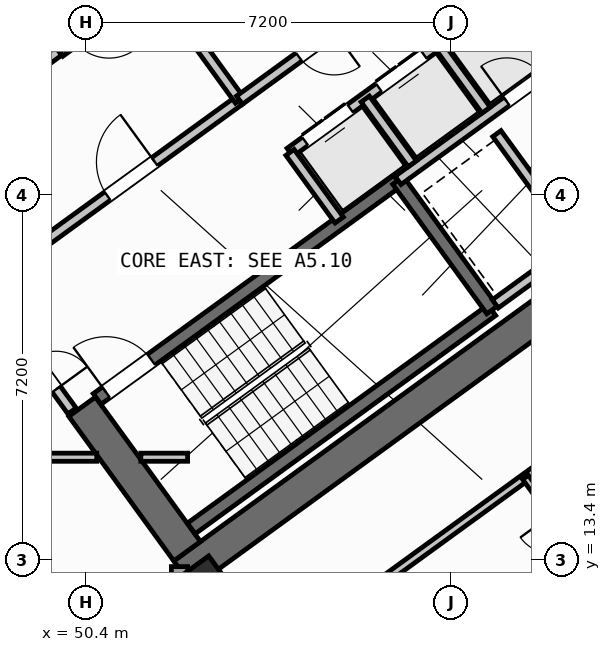
"""IFC4 building model, lengths in metres.
Left out: names, types, materials, properties, quantities, classifications, styles, units other than length and angle.
Written with IfcOpenShell. Run it as: python <this file> out.ifc"""

import sys

from ifc_helpers import new_model, si_unit, direction, frame, frame_2d, origin, origin_2d, place, context, subcontext, project, spatial, rectangle, hollow_rectangle, extrude, source, transform, mapped, element, fill, save


model = new_model("IFC4")
c1 = context("Model", 3, precision=1e-05, world=origin(), true_north=direction((0.0, 1.0)))
c2 = subcontext(c1, "Body", "Model", "MODEL_VIEW")
j1 = project(units=[si_unit("LENGTHUNIT", "METRE"), si_unit("PLANEANGLEUNIT", "RADIAN")], contexts=[c1])
p1 = place(None, origin())
s1 = spatial("IfcSite", under=j1, at=p1, CompositionType="ELEMENT")
p2 = place(p1, origin())
s2 = spatial("IfcBuilding", under=s1, at=p2, CompositionType="ELEMENT")
p3 = place(p2, frame((0.0, 0.0, 24.0)))
s3 = spatial("IfcBuildingStorey", under=s2, at=p3, CompositionType="ELEMENT", Elevation=24.0)
p4 = place(p3, frame((52.318, 13.11, 0.0), z_axis=(0.0, 0.0, 1.0), x_axis=(0.809019445368, 0.587781878776, 0.0)))
e1 = element("IfcWall", 1, at=p4, inside=s3, PredefinedType="SHEAR", context=c2, shape_type="SweptSolid", body=[
    extrude(rectangle(XDim=12.44, YDim=0.65, at=frame_2d((6.22, 0.0))), origin(), (0.0, 0.0, 1.0), 3.35),
])
p5 = place(p3, frame((52.39, 13.564, 0.0), z_axis=(0.0, 0.0, 1.0), x_axis=(-0.58779688989, 0.809008539037, 0.0)))
e2 = element("IfcWall", 2, at=p5, inside=s3, PredefinedType="SHEAR", context=c2, shape_type="SweptSolid", body=[
    extrude(rectangle(XDim=3.525, YDim=0.65, at=frame_2d((1.763, 0.0))), origin(), (0.0, 0.0, 1.0), 3.35),
])
m1 = source(origin(), c2, "Body", "SweptSolid", [
    extrude(hollow_rectangle(XDim=1.0, YDim=1.0, WallThickness=0.04, at=origin_2d()), origin(), (0.0, 0.0, 1.0), 3.6),
])
p6 = place(p3, frame((52.705, 12.773, 0.0), z_axis=(0.0, 0.0, 1.0), x_axis=(0.809016994375, 0.587785252292, 0.0)))
e3 = element("IfcColumn", 3, at=p6, inside=s3, PredefinedType="COLUMN", context=c2, shape_type="MappedRepresentation", body=[
    mapped(m1, transform((0.0, 0.0, 0.0), scale=1.0)),
])
p7 = place(p3, frame((70.18, 20.52, 0.0), z_axis=(0.0, 0.0, 1.0), x_axis=(-0.587784691012, 0.809017402169, 0.0)))
e4 = element("IfcWall", 4, at=p7, inside=s3, PredefinedType="PARAPET", context=c2, shape_type="SweptSolid", body=[
    extrude(rectangle(XDim=18.608, YDim=0.24, at=frame_2d((9.304, 0.0))), origin(), (0.0, 0.0, 1.0), 1.15),
])
p8 = place(p3, frame((57.59, 7.064, 0.0), z_axis=(0.0, 0.0, 1.0), x_axis=(0.809025796011, 0.58777313769, 0.0)))
e5 = element("IfcWall", 5, at=p8, inside=s3, PredefinedType="PARAPET", context=c2, shape_type="SweptSolid", body=[
    extrude(rectangle(XDim=10.674, YDim=0.24, at=frame_2d((5.337, 0.0))), origin(), (0.0, 0.0, 1.0), 1.15),
])
p9 = place(p3, frame((58.455, 35.484, 0.0), z_axis=(0.0, 0.0, 1.0), x_axis=(0.587783625747, -0.809018176127, 0.0)))
e6 = element("IfcWall", 6, at=p9, inside=s3, PredefinedType="STANDARD", context=c2, shape_type="SweptSolid", body=[
    extrude(rectangle(XDim=21.587, YDim=0.32, at=frame_2d((10.794, 0.0))), origin(), (0.0, 0.0, 1.0), 2.725),
])
p10 = place(p9, frame((2.994, 0.0, 0.8)))
e7 = element("IfcOpeningElement", 7, at=p10, cuts=e6, PredefinedType="OPENING", context=c2, shape_type="SweptSolid", body=[
    extrude(rectangle(XDim=2.1, YDim=1.55, at=frame_2d((1.05, 0.775))), frame((0.0, 0.17, 0.0), z_axis=(0.0, -1.0, 0.0), x_axis=(1.0, 0.0, 0.0)), (0.0, 0.0, 1.0), 0.34),
])
p11 = place(p9, frame((11.934, 0.0, 0.85)))
e8 = element("IfcOpeningElement", 8, at=p11, cuts=e6, PredefinedType="OPENING", context=c2, shape_type="SweptSolid", body=[
    extrude(rectangle(XDim=1.8, YDim=1.5, at=frame_2d((0.9, 0.75))), frame((0.0, 0.17, 0.0), z_axis=(0.0, -1.0, 0.0), x_axis=(1.0, 0.0, 0.0)), (0.0, 0.0, 1.0), 0.34),
])
p12 = place(p3, frame((71.098, 17.731, 0.0), z_axis=(0.0, 0.0, 1.0), x_axis=(-0.809021120468, -0.587779573171, 0.0)))
e9 = element("IfcWall", 9, at=p12, inside=s3, PredefinedType="STANDARD", context=c2, shape_type="SweptSolid", body=[
    extrude(rectangle(XDim=17.588, YDim=0.32, at=frame_2d((8.794, 0.0))), origin(), (0.0, 0.0, 1.0), 3.35),
])
p13 = place(p12, frame((1.611, 0.0, 0.0)))
e10 = element("IfcOpeningElement", 10, at=p13, cuts=e9, PredefinedType="OPENING", context=c2, shape_type="SweptSolid", body=[
    extrude(rectangle(XDim=1.05, YDim=2.15, at=frame_2d((0.525, 1.075))), frame((0.0, 0.17, 0.0), z_axis=(0.0, -1.0, 0.0), x_axis=(1.0, 0.0, 0.0)), (0.0, 0.0, 1.0), 0.34),
])
p14 = place(p12, frame((8.606, 0.0, 0.8)))
e11 = element("IfcOpeningElement", 11, at=p14, cuts=e9, PredefinedType="OPENING", context=c2, shape_type="SweptSolid", body=[
    extrude(rectangle(XDim=2.1, YDim=1.55, at=frame_2d((1.05, 0.775))), frame((0.0, 0.17, 0.0), z_axis=(0.0, -1.0, 0.0), x_axis=(1.0, 0.0, 0.0)), (0.0, 0.0, 1.0), 0.34),
])
p15 = place(p12, frame((12.881, 0.0, 0.8)))
e12 = element("IfcOpeningElement", 12, at=p15, cuts=e9, PredefinedType="OPENING", context=c2, shape_type="SweptSolid", body=[
    extrude(rectangle(XDim=2.1, YDim=1.55, at=frame_2d((1.05, 0.775))), frame((0.0, 0.17, 0.0), z_axis=(0.0, -1.0, 0.0), x_axis=(1.0, 0.0, 0.0)), (0.0, 0.0, 1.0), 0.34),
])
p16 = place(p3, frame((52.24, 13.261, 0.0), z_axis=(0.0, 0.0, 1.0), x_axis=(0.0, -1.0, 0.0)))
e13 = element("IfcWall", 13, at=p16, inside=s3, PredefinedType="STANDARD", context=c2, shape_type="SweptSolid", body=[
    extrude(rectangle(XDim=9.795, YDim=0.32, at=frame_2d((4.897, 0.0))), origin(), (0.0, 0.0, 1.0), 3.35),
])
p17 = place(p16, frame((3.094, 0.0, 0.8)))
e14 = element("IfcOpeningElement", 14, at=p17, cuts=e13, PredefinedType="OPENING", context=c2, shape_type="SweptSolid", body=[
    extrude(rectangle(XDim=2.1, YDim=1.55, at=frame_2d((1.05, 0.775))), frame((0.0, 0.17, 0.0), z_axis=(0.0, -1.0, 0.0), x_axis=(1.0, 0.0, 0.0)), (0.0, 0.0, 1.0), 0.34),
])
p18 = place(p16, frame((7.03, 0.0, 0.85)))
e15 = element("IfcOpeningElement", 15, at=p18, cuts=e13, PredefinedType="OPENING", context=c2, shape_type="SweptSolid", body=[
    extrude(rectangle(XDim=1.8, YDim=1.5, at=frame_2d((0.9, 0.75))), frame((0.0, 0.17, 0.0), z_axis=(0.0, -1.0, 0.0), x_axis=(1.0, 0.0, 0.0)), (0.0, 0.0, 1.0), 0.34),
])
p19 = place(p3, frame((49.863, 23.44, 0.0), z_axis=(0.0, 0.0, 1.0), x_axis=(0.809003474932, 0.587803859759, 0.0)))
e16 = element("IfcWall", 16, at=p19, inside=s3, PredefinedType="SHEAR", context=c2, shape_type="SweptSolid", body=[
    extrude(rectangle(XDim=7.46, YDim=0.26, at=frame_2d((3.73, 0.0))), origin(), (0.0, 0.0, 1.0), 3.35),
])
p20 = place(p19, frame((0.36, 0.0, 0.0)))
e17 = element("IfcOpeningElement", 17, at=p20, cuts=e16, PredefinedType="OPENING", context=c2, shape_type="SweptSolid", body=[
    extrude(rectangle(XDim=0.86, YDim=2.05, at=frame_2d((0.43, 1.025))), frame((0.0, 0.14, 0.0), z_axis=(0.0, -1.0, 0.0), x_axis=(1.0, 0.0, 0.0)), (0.0, 0.0, 1.0), 0.28),
])
p21 = place(p3, frame((49.855, 23.434, 0.0), z_axis=(0.0, 0.0, 1.0), x_axis=(-0.58776738483, 0.809029975545, 0.0)))
e18 = element("IfcWall", 18, at=p21, inside=s3, PredefinedType="SHEAR", context=c2, shape_type="SweptSolid", body=[
    extrude(rectangle(XDim=3.16, YDim=0.26, at=frame_2d((1.58, 0.0))), origin(), (0.0, 0.0, 1.0), 3.35),
])
p22 = place(p3, frame((52.472, 14.013, 0.0), z_axis=(0.0, 0.0, 1.0), x_axis=(0.809028366311, 0.587769599847, 0.0)))
e19 = element("IfcWall", 19, at=p22, inside=s3, PredefinedType="SHEAR", context=c2, shape_type="SweptSolid", body=[
    extrude(rectangle(XDim=7.33, YDim=0.26, at=frame_2d((3.665, 0.0))), origin(), (0.0, 0.0, 1.0), 3.35),
])
p23 = place(p3, frame((50.615, 16.57, 0.0), z_axis=(0.0, 0.0, 1.0), x_axis=(0.809028366311, 0.587769599847, 0.0)))
e20 = element("IfcWall", 20, at=p23, inside=s3, PredefinedType="SHEAR", context=c2, shape_type="SweptSolid", body=[
    extrude(rectangle(XDim=7.33, YDim=0.26, at=frame_2d((3.665, 0.0))), origin(), (0.0, 0.0, 1.0), 3.35),
])
p24 = place(p23, frame((0.22, 0.0, 0.0)))
e21 = element("IfcOpeningElement", 21, at=p24, cuts=e20, PredefinedType="OPENING", context=c2, shape_type="SweptSolid", body=[
    extrude(rectangle(XDim=1.1, YDim=2.1, at=frame_2d((0.55, 1.05))), frame((0.0, 0.14, 0.0), z_axis=(0.0, -1.0, 0.0), x_axis=(1.0, 0.0, 0.0)), (0.0, 0.0, 1.0), 0.28),
])
p25 = place(p3, frame((58.41, 18.327, 0.0), z_axis=(0.0, 0.0, 1.0), x_axis=(-0.58776738483, 0.809029975545, 0.0)))
e22 = element("IfcWall", 22, at=p25, inside=s3, PredefinedType="SHEAR", context=c2, shape_type="SweptSolid", body=[
    extrude(rectangle(XDim=3.16, YDim=0.26, at=frame_2d((1.58, 0.0))), origin(), (0.0, 0.0, 1.0), 3.35),
])
p26 = place(p3, frame((47.106, 21.437, 0.0), z_axis=(0.0, 0.0, 1.0), x_axis=(0.809012514015, 0.58779141893, 0.0)))
e23 = element("IfcWall", 23, at=p26, inside=s3, PredefinedType="STANDARD", context=c2, shape_type="SweptSolid", body=[
    extrude(rectangle(XDim=3.398, YDim=0.2, at=frame_2d((1.699, 0.0))), origin(), (0.0, 0.0, 1.0), 3.34),
])
p27 = place(p26, frame((0.408, 0.0, 0.0)))
e24 = element("IfcOpeningElement", 24, at=p27, cuts=e23, PredefinedType="OPENING", context=c2, shape_type="SweptSolid", body=[
    extrude(rectangle(XDim=1.3, YDim=2.2, at=frame_2d((0.65, 1.1))), frame((0.0, 0.11, 0.0), z_axis=(0.0, -1.0, 0.0), x_axis=(1.0, 0.0, 0.0)), (0.0, 0.0, 1.0), 0.22),
])
p28 = place(p3, frame((48.799, 19.107, 0.0), z_axis=(0.0, 0.0, 1.0), x_axis=(0.809012959416, 0.587790805897, 0.0)))
e25 = element("IfcWall", 25, at=p28, inside=s3, PredefinedType="STANDARD", context=c2, shape_type="SweptSolid", body=[
    extrude(rectangle(XDim=5.718, YDim=0.2, at=frame_2d((2.859, 0.0))), origin(), (0.0, 0.0, 1.0), 3.34),
])
p29 = place(p28, frame((2.498, 0.0, 0.0)))
e26 = element("IfcOpeningElement", 26, at=p29, cuts=e25, PredefinedType="OPENING", context=c2, shape_type="SweptSolid", body=[
    extrude(rectangle(XDim=1.15, YDim=2.1, at=frame_2d((0.575, 1.05))), frame((0.0, 0.11, 0.0), z_axis=(0.0, -1.0, 0.0), x_axis=(1.0, 0.0, 0.0)), (0.0, 0.0, 1.0), 0.22),
])
p30 = place(p3, frame((56.553, 20.884, 0.0), z_axis=(0.0, 0.0, 1.0), x_axis=(0.809035789462, 0.587759382205, 0.0)))
e27 = element("IfcWall", 27, at=p30, inside=s3, PredefinedType="STANDARD", context=c2, shape_type="SweptSolid", body=[
    extrude(rectangle(XDim=3.768, YDim=0.2, at=frame_2d((1.884, 0.0))), origin(), (0.0, 0.0, 1.0), 3.34),
])
p31 = place(p30, frame((2.65, 0.0, 0.0)))
e28 = element("IfcOpeningElement", 28, at=p31, cuts=e27, PredefinedType="OPENING", context=c2, shape_type="SweptSolid", body=[
    extrude(rectangle(XDim=0.86, YDim=2.05, at=frame_2d((0.43, 1.025))), frame((0.0, 0.11, 0.0), z_axis=(0.0, -1.0, 0.0), x_axis=(1.0, 0.0, 0.0)), (0.0, 0.0, 1.0), 0.22),
])
p32 = place(p3, frame((54.421, 21.436, 0.0), z_axis=(0.0, 0.0, 1.0), x_axis=(0.809013710463, 0.587789772183, 0.0)))
e29 = element("IfcWall", 29, at=p32, inside=s3, PredefinedType="STANDARD", context=c2, shape_type="SweptSolid", body=[
    extrude(rectangle(XDim=5.36, YDim=0.2, at=frame_2d((2.68, 0.0))), origin(), (0.0, 0.0, 1.0), 3.34),
])
p33 = place(p32, frame((0.37, 0.0, 0.0)))
e30 = element("IfcOpeningElement", 30, at=p33, cuts=e29, PredefinedType="OPENING", context=c2, shape_type="SweptSolid", body=[
    extrude(rectangle(XDim=1.1, YDim=2.15, at=frame_2d((0.55, 1.075))), frame((0.0, 0.11, 0.0), z_axis=(0.0, -1.0, 0.0), x_axis=(1.0, 0.0, 0.0)), (0.0, 0.0, 1.0), 0.22),
])
p34 = place(p32, frame((2.17, 0.0, 0.0)))
e31 = element("IfcOpeningElement", 31, at=p34, cuts=e29, PredefinedType="OPENING", context=c2, shape_type="SweptSolid", body=[
    extrude(rectangle(XDim=1.1, YDim=2.15, at=frame_2d((0.55, 1.075))), frame((0.0, 0.11, 0.0), z_axis=(0.0, -1.0, 0.0), x_axis=(1.0, 0.0, 0.0)), (0.0, 0.0, 1.0), 0.22),
])
p35 = place(p32, frame((3.97, 0.0, 0.0)))
e32 = element("IfcOpeningElement", 32, at=p35, cuts=e29, PredefinedType="OPENING", context=c2, shape_type="SweptSolid", body=[
    extrude(rectangle(XDim=1.1, YDim=2.15, at=frame_2d((0.55, 1.075))), frame((0.0, 0.11, 0.0), z_axis=(0.0, -1.0, 0.0), x_axis=(1.0, 0.0, 0.0)), (0.0, 0.0, 1.0), 0.22),
])
p36 = place(p3, frame((55.391, 20.102, 0.0), z_axis=(0.0, 0.0, 1.0), x_axis=(-0.58778447739, 0.809017557374, 0.0)))
e33 = element("IfcWall", 33, at=p36, inside=s3, PredefinedType="STANDARD", context=c2, shape_type="SweptSolid", body=[
    extrude(rectangle(XDim=1.65, YDim=0.2, at=frame_2d((0.825, 0.0))), origin(), (0.0, 0.0, 1.0), 3.34),
])
p37 = place(p3, frame((56.834, 21.212, 0.0), z_axis=(0.0, 0.0, 1.0), x_axis=(-0.58776738483, 0.809029975545, 0.0)))
e34 = element("IfcWall", 34, at=p37, inside=s3, PredefinedType="STANDARD", context=c2, shape_type="SweptSolid", body=[
    extrude(rectangle(XDim=1.58, YDim=0.2, at=frame_2d((0.79, 0.0))), origin(), (0.0, 0.0, 1.0), 3.34),
])
p38 = place(p3, frame((58.29, 22.27, 0.0), z_axis=(0.0, 0.0, 1.0), x_axis=(-0.587840865826, 0.808976585857, 0.0)))
e35 = element("IfcWall", 35, at=p38, inside=s3, PredefinedType="STANDARD", context=c2, shape_type="SweptSolid", body=[
    extrude(rectangle(XDim=1.58, YDim=0.2, at=frame_2d((0.79, 0.0))), origin(), (0.0, 0.0, 1.0), 3.34),
])
p39 = place(p3, frame((60.067, 19.655, 0.0), z_axis=(0.0, 0.0, 1.0), x_axis=(-0.587800520745, 0.809005900975, 0.0)))
e36 = element("IfcWall", 36, at=p39, inside=s3, PredefinedType="STANDARD", context=c2, shape_type="SweptSolid", body=[
    extrude(rectangle(XDim=2.66, YDim=0.2, at=frame_2d((1.33, 0.0))), origin(), (0.0, 0.0, 1.0), 3.34),
])
p40 = place(p3, frame((58.472, 18.447, 0.0), z_axis=(0.0, 0.0, 1.0), x_axis=(0.809022487728, 0.587777691266, 0.0)))
e37 = element("IfcWall", 37, at=p40, inside=s3, PredefinedType="STANDARD", context=c2, shape_type="SweptSolid", body=[
    extrude(rectangle(XDim=3.648, YDim=0.2, at=frame_2d((1.824, 0.0))), origin(), (0.0, 0.0, 1.0), 3.34),
])
p41 = place(p3, frame((53.425, 22.468, 0.0), z_axis=(0.0, 0.0, 1.0), x_axis=(-0.5877230039, 0.809062216821, 0.0)))
e38 = element("IfcWall", 38, at=p41, inside=s3, PredefinedType="STANDARD", context=c2, shape_type="SweptSolid", body=[
    extrude(rectangle(XDim=2.88, YDim=0.2, at=frame_2d((1.44, 0.0))), origin(), (0.0, 0.0, 1.0), 3.34),
])
p42 = place(p3, frame((53.425, 22.468, 0.0), z_axis=(0.0, 0.0, 1.0), x_axis=(0.80902705128, 0.587771409902, 0.0)))
e39 = element("IfcWall", 39, at=p42, inside=s3, PredefinedType="STANDARD", context=c2, shape_type="SweptSolid", body=[
    extrude(rectangle(XDim=5.368, YDim=0.2, at=frame_2d((2.684, 0.0))), origin(), (0.0, 0.0, 1.0), 3.34),
])
p43 = place(p42, frame((4.28, 0.0, 0.0)))
e40 = element("IfcOpeningElement", 40, at=p43, cuts=e39, PredefinedType="OPENING", context=c2, shape_type="SweptSolid", body=[
    extrude(rectangle(XDim=0.86, YDim=2.05, at=frame_2d((0.43, 1.025))), frame((0.0, 0.11, 0.0), z_axis=(0.0, -1.0, 0.0), x_axis=(1.0, 0.0, 0.0)), (0.0, 0.0, 1.0), 0.22),
])
p44 = place(p42, frame((1.45, 0.0, 0.0)))
e41 = element("IfcOpeningElement", 41, at=p44, cuts=e39, PredefinedType="OPENING", context=c2, shape_type="SweptSolid", body=[
    extrude(rectangle(XDim=0.86, YDim=2.05, at=frame_2d((0.43, 1.025))), frame((0.0, 0.11, 0.0), z_axis=(0.0, -1.0, 0.0), x_axis=(1.0, 0.0, 0.0)), (0.0, 0.0, 1.0), 0.22),
])
p45 = place(p3, frame((35.296, 15.42, 0.0), z_axis=(0.0, 0.0, 1.0), x_axis=(1.0, 0.0, 0.0)))
e42 = element("IfcWall", 42, at=p45, inside=s3, PredefinedType="PARTITIONING", context=c2, shape_type="SweptSolid", body=[
    extrude(rectangle(XDim=15.311, YDim=0.16, at=frame_2d((7.655, 0.0))), origin(), (0.0, 0.0, 1.0), 3.34),
])
p46 = place(p45, frame((0.615, 0.0, 0.0)))
e43 = element("IfcOpeningElement", 43, at=p46, cuts=e42, PredefinedType="OPENING", context=c2, shape_type="SweptSolid", body=[
    extrude(rectangle(XDim=1.0, YDim=2.1, at=frame_2d((0.5, 1.05))), frame((0.0, 0.09, 0.0), z_axis=(0.0, -1.0, 0.0), x_axis=(1.0, 0.0, 0.0)), (0.0, 0.0, 1.0), 0.18),
])
p47 = place(p45, frame((9.035, 0.0, 0.0)))
e44 = element("IfcOpeningElement", 44, at=p47, cuts=e42, PredefinedType="OPENING", context=c2, shape_type="SweptSolid", body=[
    extrude(rectangle(XDim=1.0, YDim=2.1, at=frame_2d((0.5, 1.05))), frame((0.0, 0.09, 0.0), z_axis=(0.0, -1.0, 0.0), x_axis=(1.0, 0.0, 0.0)), (0.0, 0.0, 1.0), 0.18),
])
p48 = place(p3, frame((51.477, 15.42, 0.0), z_axis=(0.0, 0.0, 1.0), x_axis=(1.0, 0.0, 0.0)))
e45 = element("IfcWall", 45, at=p48, inside=s3, PredefinedType="PARTITIONING", context=c2, shape_type="SweptSolid", body=[
    extrude(rectangle(XDim=0.923, YDim=0.16, at=frame_2d((0.461, 0.0))), origin(), (0.0, 0.0, 1.0), 3.34),
])
p49 = place(p3, frame((50.119, 16.333, 0.0), z_axis=(0.0, 0.0, 1.0), x_axis=(-0.587749856981, 0.809042709391, 0.0)))
e46 = element("IfcWall", 46, at=p49, inside=s3, PredefinedType="STANDARD", context=c2, shape_type="SweptSolid", body=[
    extrude(rectangle(XDim=2.96, YDim=0.2, at=frame_2d((1.48, 0.0))), origin(), (0.0, 0.0, 1.0), 3.34),
])
p50 = place(p49, frame((0.53, 0.0, 0.0)))
e47 = element("IfcOpeningElement", 47, at=p50, cuts=e46, PredefinedType="OPENING", context=c2, shape_type="SweptSolid", body=[
    extrude(rectangle(XDim=1.5, YDim=2.15, at=frame_2d((0.75, 1.075))), frame((0.0, 0.11, 0.0), z_axis=(0.0, -1.0, 0.0), x_axis=(1.0, 0.0, 0.0)), (0.0, 0.0, 1.0), 0.22),
])
p51 = place(p3, frame((59.827, 23.386, 0.0), z_axis=(0.0, 0.0, 1.0), x_axis=(-0.587803840107, 0.809003489211, 0.0)))
e48 = element("IfcWall", 48, at=p51, inside=s3, PredefinedType="STANDARD", context=c2, shape_type="SweptSolid", body=[
    extrude(rectangle(XDim=2.96, YDim=0.2, at=frame_2d((1.48, 0.0))), origin(), (0.0, 0.0, 1.0), 3.34),
])
p52 = place(p51, frame((1.68, 0.0, 0.0)))
e49 = element("IfcOpeningElement", 49, at=p52, cuts=e48, PredefinedType="OPENING", context=c2, shape_type="SweptSolid", body=[
    extrude(rectangle(XDim=1.0, YDim=2.1, at=frame_2d((0.5, 1.05))), frame((0.0, 0.11, 0.0), z_axis=(0.0, -1.0, 0.0), x_axis=(1.0, 0.0, 0.0)), (0.0, 0.0, 1.0), 0.22),
])
p53 = place(p3, frame((53.705, 11.126, 0.0), z_axis=(0.0, 0.0, 1.0), x_axis=(0.809014504436, 0.587788679384, 0.0)))
e50 = element("IfcWall", 50, at=p53, inside=s3, PredefinedType="PARTITIONING", context=c2, shape_type="SweptSolid", body=[
    extrude(rectangle(XDim=14.67, YDim=0.16, at=frame_2d((7.335, 0.0))), origin(), (0.0, 0.0, 1.0), 3.34),
])
p54 = place(p53, frame((10.08, 0.0, 0.0)))
e51 = element("IfcOpeningElement", 51, at=p54, cuts=e50, PredefinedType="OPENING", context=c2, shape_type="SweptSolid", body=[
    extrude(rectangle(XDim=1.0, YDim=2.1, at=frame_2d((0.5, 1.05))), frame((0.0, 0.09, 0.0), z_axis=(0.0, -1.0, 0.0), x_axis=(1.0, 0.0, 0.0)), (0.0, 0.0, 1.0), 0.18),
])
p55 = place(p3, frame((56.249, 9.785, 0.0), z_axis=(0.0, 0.0, 1.0), x_axis=(0.809011747655, 0.587792473715, 0.0)))
e52 = element("IfcWall", 52, at=p55, inside=s3, PredefinedType="PLUMBINGWALL", context=c2, shape_type="SweptSolid", body=[
    extrude(rectangle(XDim=13.4, YDim=0.14, at=frame_2d((6.7, 0.0))), origin(), (0.0, 0.0, 1.0), 3.34),
])
p56 = place(p55, frame((8.82, 0.0, 0.0)))
e53 = element("IfcOpeningElement", 53, at=p56, cuts=e52, PredefinedType="OPENING", context=c2, shape_type="SweptSolid", body=[
    extrude(rectangle(XDim=0.92, YDim=2.08, at=frame_2d((0.46, 1.04))), frame((0.0, 0.08, 0.0), z_axis=(0.0, -1.0, 0.0), x_axis=(1.0, 0.0, 0.0)), (0.0, 0.0, 1.0), 0.16),
])
p57 = place(p3, frame((60.585, 12.936, 0.0), z_axis=(0.0, 0.0, 1.0), x_axis=(-0.587772116736, 0.809026537752, 0.0)))
e54 = element("IfcWall", 54, at=p57, inside=s3, PredefinedType="PLUMBINGWALL", context=c2, shape_type="SweptSolid", body=[
    extrude(rectangle(XDim=2.58, YDim=0.14, at=frame_2d((1.29, 0.0))), origin(), (0.0, 0.0, 1.0), 3.34),
])
p58 = place(p57, frame((0.9, 0.0, 0.0)))
e55 = element("IfcOpeningElement", 55, at=p58, cuts=e54, PredefinedType="OPENING", context=c2, shape_type="SweptSolid", body=[
    extrude(rectangle(XDim=0.78, YDim=2.05, at=frame_2d((0.39, 1.025))), frame((0.0, 0.08, 0.0), z_axis=(0.0, -1.0, 0.0), x_axis=(1.0, 0.0, 0.0)), (0.0, 0.0, 1.0), 0.16),
])
m2 = source(origin(), c2, "Body", "SweptSolid", [
    extrude(rectangle(XDim=1.1, YDim=2.1, at=frame_2d((0.55, 1.05))), frame((0.0, 0.025, 0.0), z_axis=(0.0, -1.0, 0.0), x_axis=(1.0, 0.0, 0.0)), (0.0, 0.0, 1.0), 0.05),
])
p59 = place(p24, origin())
e56 = element("IfcDoor", 56, at=p59, inside=s3, OperationType="SINGLE_SWING_LEFT", PredefinedType="DOOR", context=c2, shape_type="MappedRepresentation", body=[
    mapped(m2, transform((0.0, 0.0, 0.0), scale=1.0)),
])
fill(e21, e56)
m3 = source(origin(), c2, "Body", "SweptSolid", [
    extrude(rectangle(XDim=1.15, YDim=2.1, at=frame_2d((0.575, 1.05))), frame((0.0, 0.025, 0.0), z_axis=(0.0, -1.0, 0.0), x_axis=(1.0, 0.0, 0.0)), (0.0, 0.0, 1.0), 0.05),
])
p60 = place(p29, origin())
e57 = element("IfcDoor", 57, at=p60, inside=s3, OperationType="SINGLE_SWING_RIGHT", PredefinedType="DOOR", context=c2, shape_type="MappedRepresentation", body=[
    mapped(m3, transform((0.0, 0.0, 0.0), scale=1.0)),
])
fill(e26, e57)
m4 = source(origin(), c2, "Body", "SweptSolid", [
    extrude(rectangle(XDim=1.1, YDim=2.15, at=frame_2d((0.55, 1.075))), frame((0.0, 0.025, 0.0), z_axis=(0.0, -1.0, 0.0), x_axis=(1.0, 0.0, 0.0)), (0.0, 0.0, 1.0), 0.05),
])
p61 = place(p33, origin())
e58 = element("IfcDoor", 58, at=p61, inside=s3, OperationType="DOUBLE_DOOR_SLIDING", PredefinedType="DOOR", context=c2, shape_type="MappedRepresentation", body=[
    mapped(m4, transform((0.0, 0.0, 0.0), scale=1.0)),
])
fill(e30, e58)
p62 = place(p34, origin())
e59 = element("IfcDoor", 59, at=p62, inside=s3, OperationType="DOUBLE_DOOR_SLIDING", PredefinedType="DOOR", context=c2, shape_type="MappedRepresentation", body=[
    mapped(m4, transform((0.0, 0.0, 0.0), scale=1.0)),
])
fill(e31, e59)
m5 = source(origin(), c2, "Body", "SweptSolid", [
    extrude(rectangle(XDim=0.86, YDim=2.05, at=frame_2d((0.43, 1.025))), frame((0.0, 0.025, 0.0), z_axis=(0.0, -1.0, 0.0), x_axis=(1.0, 0.0, 0.0)), (0.0, 0.0, 1.0), 0.05),
])
p63 = place(p31, origin())
e60 = element("IfcDoor", 60, at=p63, inside=s3, OperationType="SINGLE_SWING_LEFT", PredefinedType="DOOR", context=c2, shape_type="MappedRepresentation", body=[
    mapped(m5, transform((0.0, 0.0, 0.0), scale=1.0)),
])
fill(e28, e60)
p64 = place(p44, frame((0.86, 0.0, 0.0), z_axis=(0.0, 0.0, 1.0), x_axis=(-1.0, 0.0, 0.0)))
e61 = element("IfcDoor", 61, at=p64, inside=s3, OperationType="SINGLE_SWING_LEFT", PredefinedType="DOOR", context=c2, shape_type="MappedRepresentation", body=[
    mapped(m5, transform((0.0, 0.0, 0.0), scale=1.0)),
])
fill(e41, e61)
m6 = source(origin(), c2, "Body", "SweptSolid", [
    extrude(rectangle(XDim=1.5, YDim=2.15, at=frame_2d((0.75, 1.075))), frame((0.0, 0.025, 0.0), z_axis=(0.0, -1.0, 0.0), x_axis=(1.0, 0.0, 0.0)), (0.0, 0.0, 1.0), 0.05),
])
p65 = place(p50, frame((1.5, 0.0, 0.0), z_axis=(0.0, 0.0, 1.0), x_axis=(-1.0, 0.0, 0.0)))
e62 = element("IfcDoor", 62, at=p65, inside=s3, OperationType="DOUBLE_DOOR_SINGLE_SWING", PredefinedType="DOOR", context=c2, shape_type="MappedRepresentation", body=[
    mapped(m6, transform((0.0, 0.0, 0.0), scale=1.0)),
])
fill(e47, e62)
save(model, sys.argv[1])
